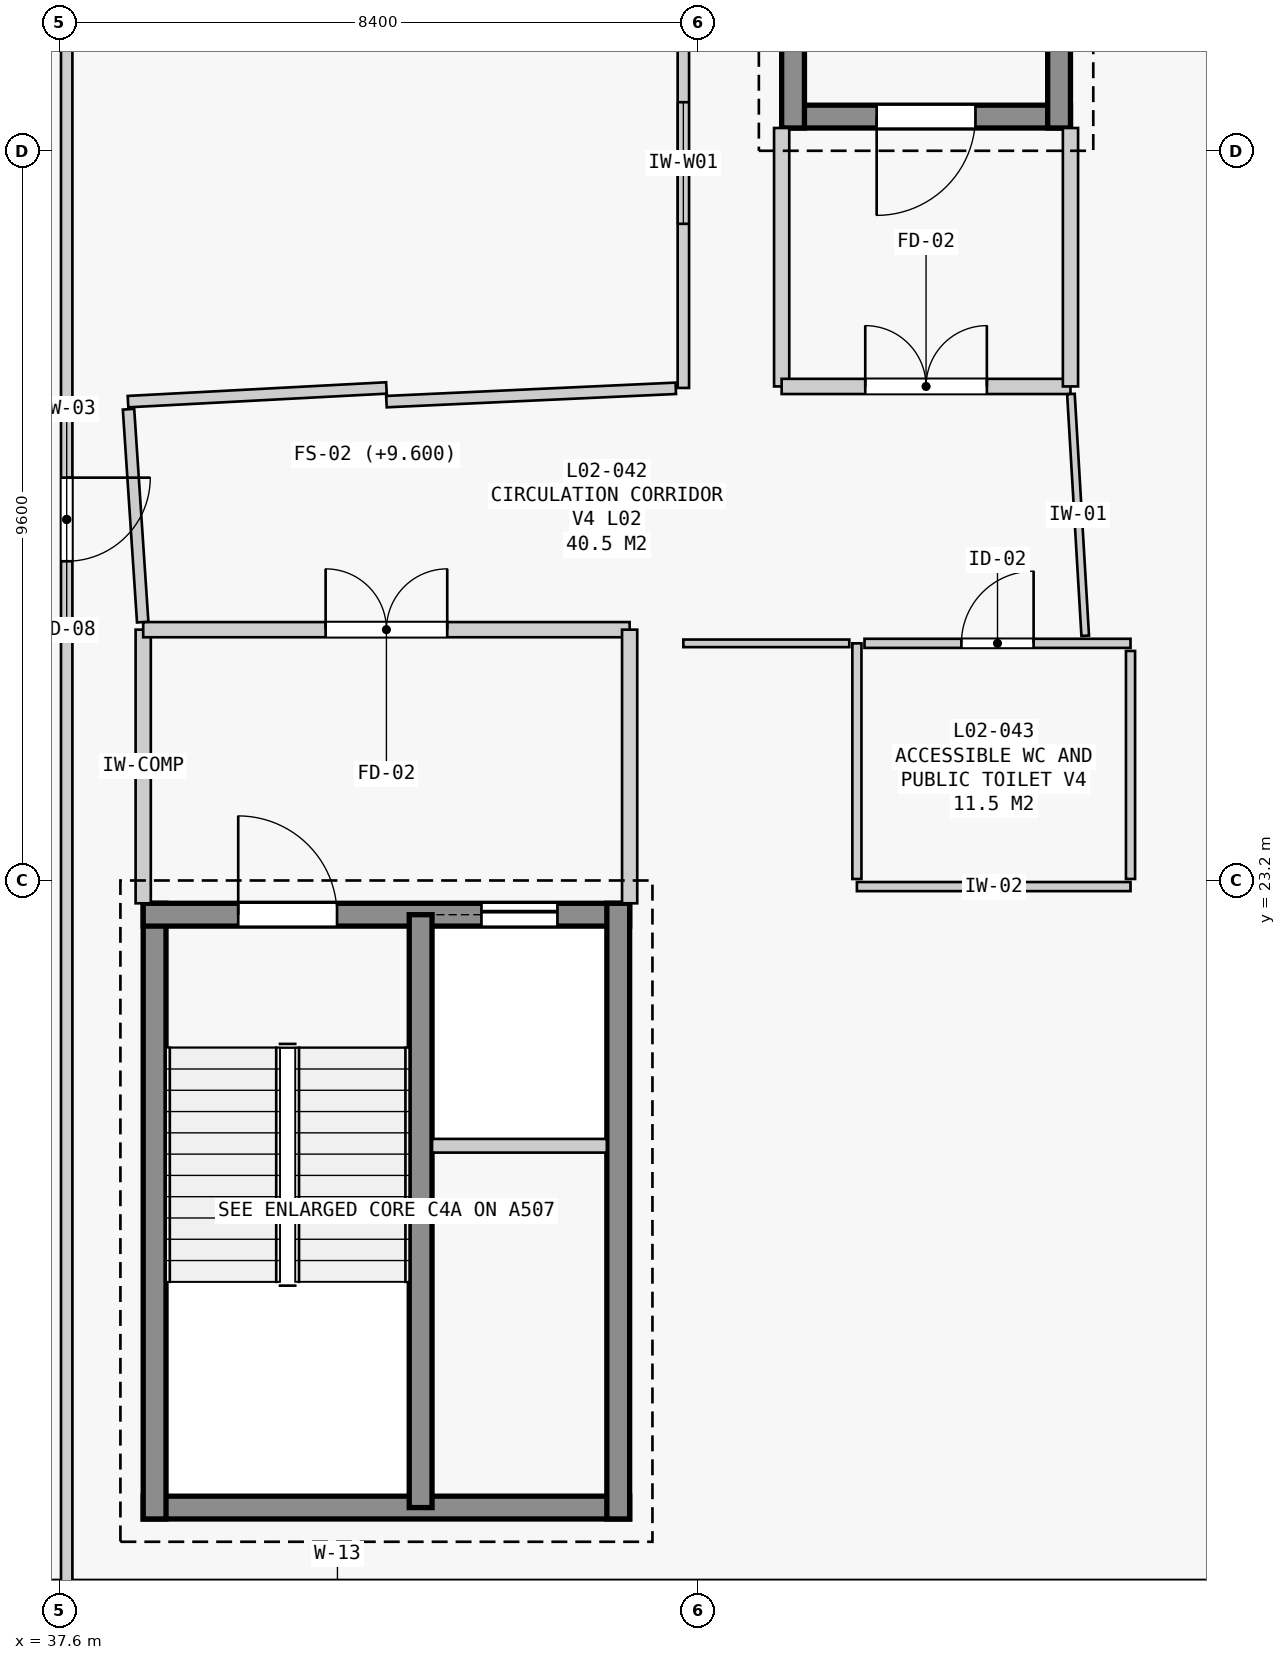
"""IFC4 building model, lengths in metres.
Left out: names, types, materials, properties, quantities, classifications, styles, units other than length and angle.
Written with IfcOpenShell. Run it as: python <this file> out.ifc"""

import sys

from ifc_helpers import new_model, si_unit, direction, frame, frame_2d, origin, place, context, subcontext, project, spatial, rectangle, extrude, element, fill, save


model = new_model("IFC4")
c1 = context("Model", 3, precision=1e-05, world=origin(), true_north=direction((0.0, 1.0)))
c2 = subcontext(c1, "Body", "Model", "MODEL_VIEW")
j1 = project(units=[si_unit("LENGTHUNIT", "METRE"), si_unit("PLANEANGLEUNIT", "RADIAN")], contexts=[c1])
p1 = place(None, origin())
s1 = spatial("IfcSite", under=j1, at=p1, CompositionType="ELEMENT")
p2 = place(p1, origin())
s2 = spatial("IfcBuilding", under=s1, at=p2, CompositionType="ELEMENT")
p3 = place(p2, frame((0.0, 0.0, 9.6)))
s3 = spatial("IfcBuildingStorey", under=s2, at=p3, CompositionType="ELEMENT", Elevation=9.6)
p4 = place(p3, frame((45.1, 14.95, 0.0), z_axis=(0.0, 0.0, 1.0), x_axis=(-1.0, 0.0, 0.0)))
e1 = element("IfcWall", 1, at=p4, inside=s3, PredefinedType="SHEAR", context=c2, shape_type="SweptSolid", body=[
    extrude(rectangle(XDim=6.4, YDim=0.3, at=frame_2d((3.2, 0.0))), origin(), (0.0, 0.0, 1.0), 3.94),
])
p5 = place(p3, frame((38.85, 14.8, 0.0), z_axis=(0.0, 0.0, 1.0), x_axis=(0.0, 1.0, 0.0)))
e2 = element("IfcWall", 2, at=p5, inside=s3, PredefinedType="SHEAR", context=c2, shape_type="SweptSolid", body=[
    extrude(rectangle(XDim=8.1, YDim=0.3, at=frame_2d((4.05, 0.0))), origin(), (0.0, 0.0, 1.0), 3.94),
])
p6 = place(p3, frame((38.7, 22.75, 0.0), z_axis=(0.0, 0.0, 1.0), x_axis=(1.0, 0.0, 0.0)))
e3 = element("IfcWall", 3, at=p6, inside=s3, PredefinedType="SHEAR", context=c2, shape_type="SweptSolid", body=[
    extrude(rectangle(XDim=6.4, YDim=0.3, at=frame_2d((3.2, 0.0))), origin(), (0.0, 0.0, 1.0), 3.94),
])
p7 = place(p6, frame((1.25, 0.0, 0.0)))
e4 = element("IfcOpeningElement", 4, at=p7, cuts=e3, PredefinedType="OPENING", context=c2, shape_type="SweptSolid", body=[
    extrude(rectangle(XDim=1.3, YDim=2.2, at=frame_2d((0.65, 1.1))), frame((0.0, 0.16, 0.0), z_axis=(0.0, -1.0, 0.0), x_axis=(1.0, 0.0, 0.0)), (0.0, 0.0, 1.0), 0.32),
])
p8 = place(p6, frame((4.45, 0.0, 0.0)))
e5 = element("IfcOpeningElement", 5, at=p8, cuts=e3, PredefinedType="OPENING", context=c2, shape_type="SweptSolid", body=[
    extrude(rectangle(XDim=1.0, YDim=2.15, at=frame_2d((0.5, 1.075))), frame((0.0, 0.16, 0.0), z_axis=(0.0, -1.0, 0.0), x_axis=(1.0, 0.0, 0.0)), (0.0, 0.0, 1.0), 0.32),
])
p9 = place(p3, frame((44.95, 22.9, 0.0), z_axis=(0.0, 0.0, 1.0), x_axis=(0.0, -1.0, 0.0)))
e6 = element("IfcWall", 6, at=p9, inside=s3, PredefinedType="SHEAR", context=c2, shape_type="SweptSolid", body=[
    extrude(rectangle(XDim=8.1, YDim=0.3, at=frame_2d((4.05, 0.0))), origin(), (0.0, 0.0, 1.0), 3.94),
])
p10 = place(p3, frame((42.35, 14.95, 0.0), z_axis=(0.0, 0.0, 1.0), x_axis=(0.0, 1.0, 0.0)))
e7 = element("IfcWall", 7, at=p10, inside=s3, PredefinedType="SHEAR", context=c2, shape_type="SweptSolid", body=[
    extrude(rectangle(XDim=7.8, YDim=0.3, at=frame_2d((3.9, 0.0))), origin(), (0.0, 0.0, 1.0), 3.94),
])
p11 = place(p3, frame((42.5, 19.71, 0.0), z_axis=(0.0, 0.0, 1.0), x_axis=(1.0, 0.0, 0.0)))
e8 = element("IfcWall", 8, at=p11, inside=s3, PredefinedType="PARTITIONING", context=c2, shape_type="SweptSolid", body=[
    extrude(rectangle(XDim=2.3, YDim=0.18, at=frame_2d((1.15, 0.0))), origin(), (0.0, 0.0, 1.0), 3.94),
])
p12 = place(p3, frame((38.7, 22.9, 0.0), z_axis=(0.0, 0.0, 1.0), x_axis=(0.0, 1.0, 0.0)))
e9 = element("IfcWall", 9, at=p12, inside=s3, PredefinedType="STANDARD", context=c2, shape_type="SweptSolid", body=[
    extrude(rectangle(XDim=3.6, YDim=0.2, at=frame_2d((1.8, 0.0))), origin(), (0.0, 0.0, 1.0), 3.22),
])
p13 = place(p3, frame((38.7, 26.5, 0.0), z_axis=(0.0, 0.0, 1.0), x_axis=(1.0, 0.0, 0.0)))
e10 = element("IfcWall", 10, at=p13, inside=s3, PredefinedType="STANDARD", context=c2, shape_type="SweptSolid", body=[
    extrude(rectangle(XDim=6.4, YDim=0.2, at=frame_2d((3.2, 0.0))), origin(), (0.0, 0.0, 1.0), 3.47),
])
p14 = place(p13, frame((2.4, 0.0, 0.0)))
e11 = element("IfcOpeningElement", 11, at=p14, cuts=e10, PredefinedType="OPENING", context=c2, shape_type="SweptSolid", body=[
    extrude(rectangle(XDim=1.6, YDim=2.2, at=frame_2d((0.8, 1.1))), frame((0.0, 0.11, 0.0), z_axis=(0.0, -1.0, 0.0), x_axis=(1.0, 0.0, 0.0)), (0.0, 0.0, 1.0), 0.22),
])
p15 = place(p3, frame((45.1, 26.5, 0.0), z_axis=(0.0, 0.0, 1.0), x_axis=(0.0, -1.0, 0.0)))
e12 = element("IfcWall", 12, at=p15, inside=s3, PredefinedType="STANDARD", context=c2, shape_type="SweptSolid", body=[
    extrude(rectangle(XDim=3.6, YDim=0.2, at=frame_2d((1.8, 0.0))), origin(), (0.0, 0.0, 1.0), 3.22),
])
p16 = place(p3, frame((50.9, 33.25, 0.0), z_axis=(0.0, 0.0, 1.0), x_axis=(-1.0, 0.0, 0.0)))
e13 = element("IfcWall", 13, at=p16, inside=s3, PredefinedType="SHEAR", context=c2, shape_type="SweptSolid", body=[
    extrude(rectangle(XDim=3.8, YDim=0.3, at=frame_2d((1.9, 0.0))), origin(), (0.0, 0.0, 1.0), 3.94),
])
p17 = place(p16, frame((1.25, 0.0, 0.0)))
e14 = element("IfcOpeningElement", 14, at=p17, cuts=e13, PredefinedType="OPENING", context=c2, shape_type="SweptSolid", body=[
    extrude(rectangle(XDim=1.3, YDim=2.2, at=frame_2d((0.65, 1.1))), frame((0.0, 0.16, 0.0), z_axis=(0.0, -1.0, 0.0), x_axis=(1.0, 0.0, 0.0)), (0.0, 0.0, 1.0), 0.32),
])
for number, where, z_axis, x_axis in (
    (15, (47.25, 33.1, 0.0), (0.0, 0.0, 1.0), (0.0, 1.0, 0.0)),
    (16, (50.75, 41.2, 0.0), (0.0, 0.0, 1.0), (0.0, -1.0, 0.0)),
):
    element("IfcWall", number, at=place(p3, frame(where, z_axis=z_axis, x_axis=x_axis)), inside=s3, PredefinedType="SHEAR", context=c2, shape_type="SweptSolid", body=[
        extrude(rectangle(XDim=8.1, YDim=0.3, at=frame_2d((4.05, 0.0))), origin(), (0.0, 0.0, 1.0), 3.94),
    ])
p18 = place(p3, frame((47.1, 33.1, 0.0), z_axis=(0.0, 0.0, 1.0), x_axis=(0.0, -1.0, 0.0)))
e17 = element("IfcWall", 17, at=p18, inside=s3, PredefinedType="STANDARD", context=c2, shape_type="SweptSolid", body=[
    extrude(rectangle(XDim=3.4, YDim=0.2, at=frame_2d((1.7, 0.0))), origin(), (0.0, 0.0, 1.0), 3.12),
])
p19 = place(p3, frame((47.1, 29.7, 0.0), z_axis=(0.0, 0.0, 1.0), x_axis=(1.0, 0.0, 0.0)))
e18 = element("IfcWall", 18, at=p19, inside=s3, PredefinedType="STANDARD", context=c2, shape_type="SweptSolid", body=[
    extrude(rectangle(XDim=3.8, YDim=0.2, at=frame_2d((1.9, 0.0))), origin(), (0.0, 0.0, 1.0), 3.94),
])
p20 = place(p19, frame((1.1, 0.0, 0.0)))
e19 = element("IfcOpeningElement", 19, at=p20, cuts=e18, PredefinedType="OPENING", context=c2, shape_type="SweptSolid", body=[
    extrude(rectangle(XDim=1.6, YDim=2.2, at=frame_2d((0.8, 1.1))), frame((0.0, 0.11, 0.0), z_axis=(0.0, -1.0, 0.0), x_axis=(1.0, 0.0, 0.0)), (0.0, 0.0, 1.0), 0.22),
])
p21 = place(p3, frame((50.9, 29.7, 0.0), z_axis=(0.0, 0.0, 1.0), x_axis=(0.0, 1.0, 0.0)))
e20 = element("IfcWall", 20, at=p21, inside=s3, PredefinedType="STANDARD", context=c2, shape_type="SweptSolid", body=[
    extrude(rectangle(XDim=3.4, YDim=0.2, at=frame_2d((1.7, 0.0))), origin(), (0.0, 0.0, 1.0), 3.12),
])
p22 = place(p3, frame((51.69, 23.12, 0.0), z_axis=(0.0, 0.0, 1.0), x_axis=(-1.0, 0.0, 0.0)))
e21 = element("IfcWall", 21, at=p22, inside=s3, PredefinedType="PARTITIONING", context=c2, shape_type="SweptSolid", body=[
    extrude(rectangle(XDim=3.6, YDim=0.12, at=frame_2d((1.8, 0.0))), origin(), (0.0, 0.0, 1.0), 3.22),
])
p23 = place(p3, frame((48.09, 23.22, 0.0), z_axis=(0.0, 0.0, 1.0), x_axis=(0.0, 1.0, 0.0)))
e22 = element("IfcWall", 22, at=p23, inside=s3, PredefinedType="PARTITIONING", context=c2, shape_type="SweptSolid", body=[
    extrude(rectangle(XDim=3.1, YDim=0.12, at=frame_2d((1.55, 0.0))), origin(), (0.0, 0.0, 1.0), 3.22),
])
p24 = place(p3, frame((48.19, 26.32, 0.0), z_axis=(0.0, 0.0, 1.0), x_axis=(1.0, 0.0, 0.0)))
e23 = element("IfcWall", 23, at=p24, inside=s3, PredefinedType="PARTITIONING", context=c2, shape_type="SweptSolid", body=[
    extrude(rectangle(XDim=3.5, YDim=0.12, at=frame_2d((1.75, 0.0))), origin(), (0.0, 0.0, 1.0), 3.94),
])
p25 = place(p24, frame((1.275, 0.0, 0.0)))
e24 = element("IfcOpeningElement", 24, at=p25, cuts=e23, PredefinedType="OPENING", context=c2, shape_type="SweptSolid", body=[
    extrude(rectangle(XDim=0.95, YDim=2.15, at=frame_2d((0.475, 1.075))), frame((0.0, 0.07, 0.0), z_axis=(0.0, -1.0, 0.0), x_axis=(1.0, 0.0, 0.0)), (0.0, 0.0, 1.0), 0.14),
])
p26 = place(p3, frame((51.69, 26.22, 0.0), z_axis=(0.0, 0.0, 1.0), x_axis=(0.0, -1.0, 0.0)))
e25 = element("IfcWall", 25, at=p26, inside=s3, PredefinedType="PARTITIONING", context=c2, shape_type="SweptSolid", body=[
    extrude(rectangle(XDim=3.0, YDim=0.12, at=frame_2d((1.5, 0.0))), origin(), (0.0, 0.0, 1.0), 3.22),
])
p27 = place(p3, frame((37.693, 42.01, 0.0), z_axis=(0.0, 0.0, 1.0), x_axis=(0.0, -1.0, 0.0)))
e26 = element("IfcWall", 26, at=p27, inside=s3, PredefinedType="PARTITIONING", context=c2, shape_type="SweptSolid", body=[
    extrude(rectangle(XDim=28.12, YDim=0.15, at=frame_2d((14.06, 0.0))), origin(), (0.0, 0.0, 1.0), 3.12),
])
p28 = place(p27, frame((13.51, 0.0, 0.0)))
e27 = element("IfcOpeningElement", 27, at=p28, cuts=e26, PredefinedType="OPENING", context=c2, shape_type="SweptSolid", body=[
    extrude(rectangle(XDim=1.1, YDim=2.2, at=frame_2d((0.55, 1.1))), frame((0.0, 0.085, 0.0), z_axis=(0.0, -1.0, 0.0), x_axis=(1.0, 0.0, 0.0)), (0.0, 0.0, 1.0), 0.17),
])
p29 = place(p3, frame((45.807, 42.01, 0.0), z_axis=(0.0, 0.0, 1.0), x_axis=(0.0, -1.0, 0.0)))
e28 = element("IfcWall", 28, at=p29, inside=s3, PredefinedType="PARTITIONING", context=c2, shape_type="SweptSolid", body=[
    extrude(rectangle(XDim=12.33, YDim=0.15, at=frame_2d((6.165, 0.0))), origin(), (0.0, 0.0, 1.0), 3.12),
])
p30 = place(p29, frame((5.64, 0.0, 0.0)))
e29 = element("IfcOpeningElement", 29, at=p30, cuts=e28, PredefinedType="OPENING", context=c2, shape_type="SweptSolid", body=[
    extrude(rectangle(XDim=1.05, YDim=2.2, at=frame_2d((0.525, 1.1))), frame((0.0, 0.085, 0.0), z_axis=(0.0, -1.0, 0.0), x_axis=(1.0, 0.0, 0.0)), (0.0, 0.0, 1.0), 0.17),
])
p31 = place(p29, frame((8.571, 0.0, 1.05)))
e30 = element("IfcOpeningElement", 30, at=p31, cuts=e28, PredefinedType="OPENING", context=c2, shape_type="SweptSolid", body=[
    extrude(rectangle(XDim=1.6, YDim=1.5, at=frame_2d((0.8, 0.75))), frame((0.0, 0.085, 0.0), z_axis=(0.0, -1.0, 0.0), x_axis=(1.0, 0.0, 0.0)), (0.0, 0.0, 1.0), 0.17),
])
p32 = place(p29, frame((4.315, 0.0, 0.0)))
e31 = element("IfcOpeningElement", 31, at=p32, cuts=e28, PredefinedType="OPENING", context=c2, shape_type="SweptSolid", body=[
    extrude(rectangle(XDim=1.0, YDim=2.15, at=frame_2d((0.5, 1.075))), frame((0.0, 0.085, 0.0), z_axis=(0.0, -1.0, 0.0), x_axis=(1.0, 0.0, 0.0)), (0.0, 0.0, 1.0), 0.17),
])
p33 = place(p3, frame((45.707, 29.675, 0.0), z_axis=(0.0, 0.0, 1.0), x_axis=(-0.998941551841, -0.045997565204, 0.0)))
e32 = element("IfcWall", 32, at=p33, inside=s3, PredefinedType="PARTITIONING", context=c2, shape_type="SweptSolid", body=[
    extrude(rectangle(XDim=3.811, YDim=0.15, at=frame_2d((1.906, 0.0))), origin(), (0.0, 0.0, 1.0), 3.47),
])
p34 = place(p3, frame((41.9, 29.68, 0.0), z_axis=(0.0, 0.0, 1.0), x_axis=(-0.998602534522, -0.052848633344, 0.0)))
e33 = element("IfcWall", 33, at=p34, inside=s3, PredefinedType="PARTITIONING", context=c2, shape_type="SweptSolid", body=[
    extrude(rectangle(XDim=3.405, YDim=0.15, at=frame_2d((1.702, 0.0))), origin(), (0.0, 0.0, 1.0), 3.94),
])
p35 = place(p3, frame((38.507, 29.4, 0.0), z_axis=(0.0, 0.0, 1.0), x_axis=(0.066547879088, -0.997783232866, 0.0)))
e34 = element("IfcWall", 34, at=p35, inside=s3, PredefinedType="PARTITIONING", context=c2, shape_type="SweptSolid", body=[
    extrude(rectangle(XDim=2.806, YDim=0.15, at=frame_2d((1.403, 0.0))), origin(), (0.0, 0.0, 1.0), 3.94),
])
p36 = place(p3, frame((45.807, 26.32, 0.0), z_axis=(0.0, 0.0, 1.0), x_axis=(1.0, 0.0, 0.0)))
e35 = element("IfcWall", 35, at=p36, inside=s3, PredefinedType="PARTITIONING", context=c2, shape_type="SweptSolid", body=[
    extrude(rectangle(XDim=2.183, YDim=0.1, at=frame_2d((1.092, 0.0))), origin(), (0.0, 0.0, 1.0), 3.94),
])
p37 = place(p3, frame((51.094, 26.42, 0.0), z_axis=(0.0, 0.0, 1.0), x_axis=(-0.059009535749, 0.998257419051, 0.0)))
e36 = element("IfcWall", 36, at=p37, inside=s3, PredefinedType="PARTITIONING", context=c2, shape_type="SweptSolid", body=[
    extrude(rectangle(XDim=3.186, YDim=0.1, at=frame_2d((1.593, 0.0))), origin(), (0.0, 0.0, 1.0), 3.94),
])
p38 = place(p7, origin())
e37 = element("IfcDoor", 37, at=p38, inside=s3, OperationType="SINGLE_SWING_LEFT", PredefinedType="DOOR", context=c2, shape_type="SweptSolid", body=[
    extrude(rectangle(XDim=1.3, YDim=2.2, at=frame_2d((0.65, 1.1))), frame((0.0, 0.025, 0.0), z_axis=(0.0, -1.0, 0.0), x_axis=(1.0, 0.0, 0.0)), (0.0, 0.0, 1.0), 0.05),
])
fill(e4, e37)
p39 = place(p8, origin())
e38 = element("IfcDoor", 38, at=p39, inside=s3, OperationType="SLIDING_TO_LEFT", PredefinedType="DOOR", context=c2, shape_type="SweptSolid", body=[
    extrude(rectangle(XDim=1.0, YDim=2.15, at=frame_2d((0.5, 1.075))), frame((0.0, 0.025, 0.0), z_axis=(0.0, -1.0, 0.0), x_axis=(1.0, 0.0, 0.0)), (0.0, 0.0, 1.0), 0.05),
])
fill(e5, e38)
p40 = place(p17, origin())
e39 = element("IfcDoor", 39, at=p40, inside=s3, OperationType="SINGLE_SWING_RIGHT", PredefinedType="DOOR", context=c2, shape_type="SweptSolid", body=[
    extrude(rectangle(XDim=1.3, YDim=2.2, at=frame_2d((0.65, 1.1))), frame((0.0, 0.025, 0.0), z_axis=(0.0, -1.0, 0.0), x_axis=(1.0, 0.0, 0.0)), (0.0, 0.0, 1.0), 0.05),
])
fill(e14, e39)
p41 = place(p14, origin())
e40 = element("IfcDoor", 40, at=p41, inside=s3, OperationType="DOUBLE_DOOR_SINGLE_SWING", PredefinedType="DOOR", context=c2, shape_type="SweptSolid", body=[
    extrude(rectangle(XDim=1.6, YDim=2.2, at=frame_2d((0.8, 1.1))), frame((0.0, 0.025, 0.0), z_axis=(0.0, -1.0, 0.0), x_axis=(1.0, 0.0, 0.0)), (0.0, 0.0, 1.0), 0.05),
])
fill(e11, e40)
p42 = place(p20, origin())
e41 = element("IfcDoor", 41, at=p42, inside=s3, OperationType="DOUBLE_DOOR_SINGLE_SWING", PredefinedType="DOOR", context=c2, shape_type="SweptSolid", body=[
    extrude(rectangle(XDim=1.6, YDim=2.2, at=frame_2d((0.8, 1.1))), frame((0.0, 0.025, 0.0), z_axis=(0.0, -1.0, 0.0), x_axis=(1.0, 0.0, 0.0)), (0.0, 0.0, 1.0), 0.05),
])
fill(e19, e41)
p43 = place(p25, origin())
e42 = element("IfcDoor", 42, at=p43, inside=s3, OperationType="SINGLE_SWING_RIGHT", PredefinedType="DOOR", context=c2, shape_type="SweptSolid", body=[
    extrude(rectangle(XDim=0.95, YDim=2.15, at=frame_2d((0.475, 1.075))), frame((0.0, 0.025, 0.0), z_axis=(0.0, -1.0, 0.0), x_axis=(1.0, 0.0, 0.0)), (0.0, 0.0, 1.0), 0.05),
])
fill(e24, e42)
p44 = place(p28, origin())
e43 = element("IfcDoor", 43, at=p44, inside=s3, OperationType="SINGLE_SWING_LEFT", PredefinedType="DOOR", context=c2, shape_type="SweptSolid", body=[
    extrude(rectangle(XDim=1.1, YDim=2.2, at=frame_2d((0.55, 1.1))), frame((0.0, 0.025, 0.0), z_axis=(0.0, -1.0, 0.0), x_axis=(1.0, 0.0, 0.0)), (0.0, 0.0, 1.0), 0.05),
])
fill(e27, e43)
p45 = place(p31, origin())
e44 = element("IfcWindow", 44, at=p45, inside=s3, PartitioningType="SINGLE_PANEL", PredefinedType="WINDOW", context=c2, shape_type="SweptSolid", body=[
    extrude(rectangle(XDim=1.6, YDim=1.5, at=frame_2d((0.8, 0.75))), frame((0.0, 0.03, 0.0), z_axis=(0.0, -1.0, 0.0), x_axis=(1.0, 0.0, 0.0)), (0.0, 0.0, 1.0), 0.06),
])
fill(e30, e44)
save(model, sys.argv[1])
